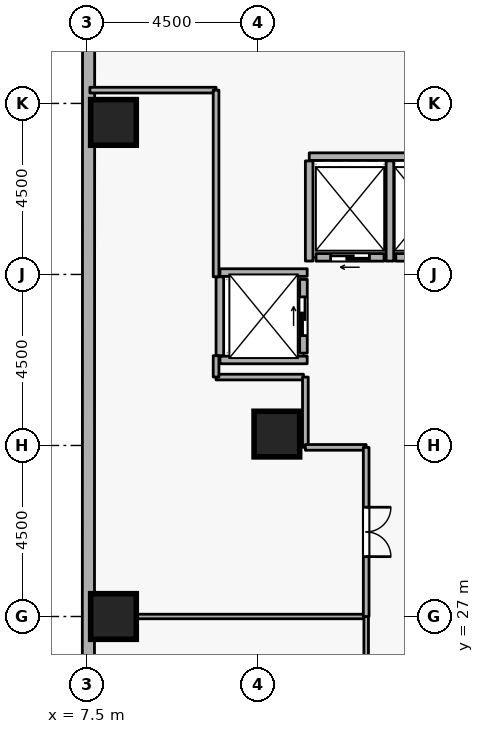
"""IFC4 building model, lengths in metres.
Left out: names, types, materials, properties, quantities, classifications, styles, units other than length and angle.
Written with IfcOpenShell. Run it as: python <this file> out.ifc"""

import sys

from ifc_helpers import new_model, si_unit, direction, frame, frame_2d, origin, origin_2d, place, context, subcontext, project, spatial, rectangle, extrude, element, fill, save


model = new_model("IFC4")
c1 = context("Model", 3, precision=1e-05, world=origin(), true_north=direction((0.0, 1.0)))
c2 = subcontext(c1, "Body", "Model", "MODEL_VIEW")
j1 = project(units=[si_unit("LENGTHUNIT", "METRE"), si_unit("PLANEANGLEUNIT", "RADIAN")], contexts=[c1])
p1 = place(None, origin())
s1 = spatial("IfcSite", under=j1, at=p1, CompositionType="ELEMENT")
p2 = place(p1, origin())
s2 = spatial("IfcBuilding", under=s1, at=p2, CompositionType="ELEMENT")
p3 = place(p2, frame((0.0, 0.0, 75.9)))
s3 = spatial("IfcBuildingStorey", under=s2, at=p3, CompositionType="ELEMENT", Elevation=75.9)
for number, where, z_axis, x_axis in (
    (1, (8.2, 27.0, 0.0), (0.0, 0.0, 1.0), (1.0, 0.0, 0.0)),
    (2, (8.2, 40.0, 0.0), (0.0, 0.0, 1.0), (1.0, 0.0, 0.0)),
    (3, (12.5, 31.8, 0.0), (0.0, 0.0, 1.0), (1.0, 0.0, 0.0)),
):
    element("IfcColumn", number, at=place(p3, frame(where, z_axis=z_axis, x_axis=x_axis)), inside=s3, PredefinedType="COLUMN", context=c2, shape_type="SweptSolid", body=[
        extrude(rectangle(XDim=1.2, YDim=1.2, at=origin_2d()), origin(), (0.0, 0.0, 1.0), 4.2),
    ])
p4 = place(p3, frame((7.547, 44.796, 0.0), z_axis=(0.0, 0.0, 1.0), x_axis=(-0.000353213856, -0.99999993762, 0.0)))
e4 = element("IfcWall", 4, at=p4, inside=s3, PredefinedType="STANDARD", context=c2, shape_type="SweptSolid", body=[
    extrude(rectangle(XDim=33.177, YDim=0.32, at=frame_2d((16.589, 0.0))), origin(), (0.0, 0.0, 1.0), 3.3),
])
p5 = place(p3, frame((17.37, 36.45, 0.0), z_axis=(0.0, 0.0, 1.0), x_axis=(-1.0, 0.0, 0.0)))
e5 = element("IfcWall", 5, at=p5, inside=s3, PredefinedType="STANDARD", context=c2, shape_type="SweptSolid", body=[
    extrude(rectangle(XDim=1.74, YDim=0.2, at=frame_2d((0.87, 0.0))), origin(), (0.0, 0.0, 1.0), 3.94),
])
p6 = place(p5, frame((0.36, 0.0, 0.0)))
e6 = element("IfcOpeningElement", 6, at=p6, cuts=e5, PredefinedType="OPENING", context=c2, shape_type="SweptSolid", body=[
    extrude(rectangle(XDim=1.02, YDim=2.06, at=frame_2d((0.51, 1.03))), frame((0.0, 0.11, 0.0), z_axis=(0.0, -1.0, 0.0), x_axis=(1.0, 0.0, 0.0)), (0.0, 0.0, 1.0), 0.22),
])
p7 = place(p3, frame((15.32, 36.45, 0.0), z_axis=(0.0, 0.0, 1.0), x_axis=(-1.0, 0.0, 0.0)))
e7 = element("IfcWall", 7, at=p7, inside=s3, PredefinedType="STANDARD", context=c2, shape_type="SweptSolid", body=[
    extrude(rectangle(XDim=1.79, YDim=0.2, at=frame_2d((0.895, 0.0))), origin(), (0.0, 0.0, 1.0), 3.94),
])
p8 = place(p7, frame((0.385, 0.0, 0.0)))
e8 = element("IfcOpeningElement", 8, at=p8, cuts=e7, PredefinedType="OPENING", context=c2, shape_type="SweptSolid", body=[
    extrude(rectangle(XDim=1.02, YDim=2.06, at=frame_2d((0.51, 1.03))), frame((0.0, 0.11, 0.0), z_axis=(0.0, -1.0, 0.0), x_axis=(1.0, 0.0, 0.0)), (0.0, 0.0, 1.0), 0.22),
])
p9 = place(p3, frame((13.2, 33.93, 0.0), z_axis=(0.0, 0.0, 1.0), x_axis=(0.0, 1.0, 0.0)))
e9 = element("IfcWall", 9, at=p9, inside=s3, PredefinedType="STANDARD", context=c2, shape_type="SweptSolid", body=[
    extrude(rectangle(XDim=1.94, YDim=0.2, at=frame_2d((0.97, 0.0))), origin(), (0.0, 0.0, 1.0), 3.94),
])
p10 = place(p9, frame((0.46, 0.0, 0.0)))
e10 = element("IfcOpeningElement", 10, at=p10, cuts=e9, PredefinedType="OPENING", context=c2, shape_type="SweptSolid", body=[
    extrude(rectangle(XDim=1.02, YDim=2.06, at=frame_2d((0.51, 1.03))), frame((0.0, 0.11, 0.0), z_axis=(0.0, -1.0, 0.0), x_axis=(1.0, 0.0, 0.0)), (0.0, 0.0, 1.0), 0.22),
])
p11 = place(p3, frame((13.352, 39.1, 0.0), z_axis=(0.0, 0.0, 1.0), x_axis=(1.0, 0.0, 0.0)))
e11 = element("IfcWall", 11, at=p11, inside=s3, PredefinedType="STANDARD", context=c2, shape_type="SweptSolid", body=[
    extrude(rectangle(XDim=4.196, YDim=0.2, at=frame_2d((2.098, 0.0))), origin(), (0.0, 0.0, 1.0), 3.94),
])
for number, where, z_axis, x_axis in (
    (12, (15.475, 36.352, 0.0), (0.0, 0.0, 1.0), (0.0, 1.0, 0.0)),
    (13, (13.35, 36.352, 0.0), (0.0, 0.0, 1.0), (0.0, 1.0, 0.0)),
):
    element("IfcWall", number, at=place(p3, frame(where, z_axis=z_axis, x_axis=x_axis)), inside=s3, PredefinedType="STANDARD", context=c2, shape_type="SweptSolid", body=[
        extrude(rectangle(XDim=2.636, YDim=0.2, at=frame_2d((1.318, 0.0))), origin(), (0.0, 0.0, 1.0), 3.94),
    ])
for number, where, z_axis, x_axis in (
    (14, (11.002, 36.05, 0.0), (0.0, 0.0, 1.0), (1.0, 0.0, 0.0)),
    (15, (11.002, 33.75, 0.0), (0.0, 0.0, 1.0), (1.0, 0.0, 0.0)),
):
    element("IfcWall", number, at=place(p3, frame(where, z_axis=z_axis, x_axis=x_axis)), inside=s3, PredefinedType="STANDARD", context=c2, shape_type="SweptSolid", body=[
        extrude(rectangle(XDim=2.296, YDim=0.2, at=frame_2d((1.148, 0.0))), origin(), (0.0, 0.0, 1.0), 3.94),
    ])
p12 = place(p3, frame((11.0, 33.862, 0.0), z_axis=(0.0, 0.0, 1.0), x_axis=(0.0, 1.0, 0.0)))
e16 = element("IfcWall", 16, at=p12, inside=s3, PredefinedType="STANDARD", context=c2, shape_type="SweptSolid", body=[
    extrude(rectangle(XDim=2.076, YDim=0.2, at=frame_2d((1.038, 0.0))), origin(), (0.0, 0.0, 1.0), 3.94),
])
p13 = place(p3, frame((7.58, 27.0, 0.0), z_axis=(0.0, 0.0, 1.0), x_axis=(1.0, 0.0, 0.0)))
e17 = element("IfcWall", 17, at=p13, inside=s3, PredefinedType="PARTITIONING", context=c2, shape_type="SweptSolid", body=[
    extrude(rectangle(XDim=7.27, YDim=0.12, at=frame_2d((3.635, 0.0))), origin(), (0.0, 0.0, 1.0), 3.482),
])
p14 = place(p3, frame((14.85, 27.0, 0.0), z_axis=(0.0, 0.0, 1.0), x_axis=(0.0, -1.0, 0.0)))
e18 = element("IfcWall", 18, at=p14, inside=s3, PredefinedType="PARTITIONING", context=c2, shape_type="SweptSolid", body=[
    extrude(rectangle(XDim=4.45, YDim=0.12, at=frame_2d((2.225, 0.0))), origin(), (0.0, 0.0, 1.0), 3.94),
])
p15 = place(p14, frame((1.7, 0.0, 0.0)))
e19 = element("IfcOpeningElement", 19, at=p15, cuts=e18, PredefinedType="OPENING", context=c2, shape_type="SweptSolid", body=[
    extrude(rectangle(XDim=1.05, YDim=2.1, at=frame_2d((0.525, 1.05))), frame((0.0, 0.07, 0.0), z_axis=(0.0, -1.0, 0.0), x_axis=(1.0, 0.0, 0.0)), (0.0, 0.0, 1.0), 0.14),
])
p16 = place(p3, frame((10.9, 33.3, 0.0), z_axis=(0.0, 0.0, 1.0), x_axis=(1.0, 0.0, 0.0)))
e20 = element("IfcWall", 20, at=p16, inside=s3, PredefinedType="PARTITIONING", context=c2, shape_type="SweptSolid", body=[
    extrude(rectangle(XDim=2.3, YDim=0.15, at=frame_2d((1.15, 0.0))), origin(), (0.0, 0.0, 1.0), 3.94),
])
p17 = place(p3, frame((13.25, 33.3, 0.0), z_axis=(0.0, 0.0, 1.0), x_axis=(0.0, -1.0, 0.0)))
e21 = element("IfcWall", 21, at=p17, inside=s3, PredefinedType="PARTITIONING", context=c2, shape_type="SweptSolid", body=[
    extrude(rectangle(XDim=1.85, YDim=0.15, at=frame_2d((0.925, 0.0))), origin(), (0.0, 0.0, 1.0), 3.94),
])
p18 = place(p3, frame((13.25, 31.45, 0.0), z_axis=(0.0, 0.0, 1.0), x_axis=(1.0, 0.0, 0.0)))
e22 = element("IfcWall", 22, at=p18, inside=s3, PredefinedType="PARTITIONING", context=c2, shape_type="SweptSolid", body=[
    extrude(rectangle(XDim=1.6, YDim=0.15, at=frame_2d((0.8, 0.0))), origin(), (0.0, 0.0, 1.0), 3.94),
])
p19 = place(p3, frame((14.85, 31.45, 0.0), z_axis=(0.0, 0.0, 1.0), x_axis=(0.0, -1.0, 0.0)))
e23 = element("IfcWall", 23, at=p19, inside=s3, PredefinedType="PARTITIONING", context=c2, shape_type="SweptSolid", body=[
    extrude(rectangle(XDim=4.45, YDim=0.15, at=frame_2d((2.225, 0.0))), origin(), (0.0, 0.0, 1.0), 3.94),
])
p20 = place(p19, frame((1.575, 0.0, 0.0)))
e24 = element("IfcOpeningElement", 24, at=p20, cuts=e23, PredefinedType="OPENING", context=c2, shape_type="SweptSolid", body=[
    extrude(rectangle(XDim=1.3, YDim=2.12, at=frame_2d((0.65, 1.06))), frame((0.0, 0.085, 0.0), z_axis=(0.0, -1.0, 0.0), x_axis=(1.0, 0.0, 0.0)), (0.0, 0.0, 1.0), 0.17),
])
p21 = place(p3, frame((7.58, 40.85, 0.0), z_axis=(0.0, 0.0, 1.0), x_axis=(1.0, 0.0, 0.0)))
e25 = element("IfcWall", 25, at=p21, inside=s3, PredefinedType="PARTITIONING", context=c2, shape_type="SweptSolid", body=[
    extrude(rectangle(XDim=3.32, YDim=0.15, at=frame_2d((1.66, 0.0))), origin(), (0.0, 0.0, 1.0), 3.94),
])
p22 = place(p3, frame((10.9, 40.85, 0.0), z_axis=(0.0, 0.0, 1.0), x_axis=(0.0, -1.0, 0.0)))
e26 = element("IfcWall", 26, at=p22, inside=s3, PredefinedType="PARTITIONING", context=c2, shape_type="SweptSolid", body=[
    extrude(rectangle(XDim=4.912, YDim=0.15, at=frame_2d((2.456, 0.0))), origin(), (0.0, 0.0, 1.0), 3.94),
])
p23 = place(p3, frame((10.9, 33.862, 0.0), z_axis=(0.0, 0.0, 1.0), x_axis=(0.0, -1.0, 0.0)))
e27 = element("IfcWall", 27, at=p23, inside=s3, PredefinedType="PARTITIONING", context=c2, shape_type="SweptSolid", body=[
    extrude(rectangle(XDim=0.562, YDim=0.15, at=frame_2d((0.281, 0.0))), origin(), (0.0, 0.0, 1.0), 3.94),
])
p24 = place(p8, origin())
e28 = element("IfcDoor", 28, at=p24, inside=s3, OperationType="SLIDING_TO_LEFT", PredefinedType="DOOR", context=c2, shape_type="SweptSolid", body=[
    extrude(rectangle(XDim=1.02, YDim=2.06, at=frame_2d((0.51, 1.03))), frame((0.0, 0.025, 0.0), z_axis=(0.0, -1.0, 0.0), x_axis=(1.0, 0.0, 0.0)), (0.0, 0.0, 1.0), 0.05),
])
fill(e8, e28)
p25 = place(p10, origin())
e29 = element("IfcDoor", 29, at=p25, inside=s3, OperationType="SLIDING_TO_LEFT", PredefinedType="DOOR", context=c2, shape_type="SweptSolid", body=[
    extrude(rectangle(XDim=1.02, YDim=2.06, at=frame_2d((0.51, 1.03))), frame((0.0, 0.025, 0.0), z_axis=(0.0, -1.0, 0.0), x_axis=(1.0, 0.0, 0.0)), (0.0, 0.0, 1.0), 0.05),
])
fill(e10, e29)
p26 = place(p20, origin())
e30 = element("IfcDoor", 30, at=p26, inside=s3, OperationType="DOUBLE_DOOR_SINGLE_SWING", PredefinedType="DOOR", context=c2, shape_type="SweptSolid", body=[
    extrude(rectangle(XDim=1.3, YDim=2.12, at=frame_2d((0.65, 1.06))), frame((0.0, 0.025, 0.0), z_axis=(0.0, -1.0, 0.0), x_axis=(1.0, 0.0, 0.0)), (0.0, 0.0, 1.0), 0.05),
])
fill(e24, e30)
save(model, sys.argv[1])
